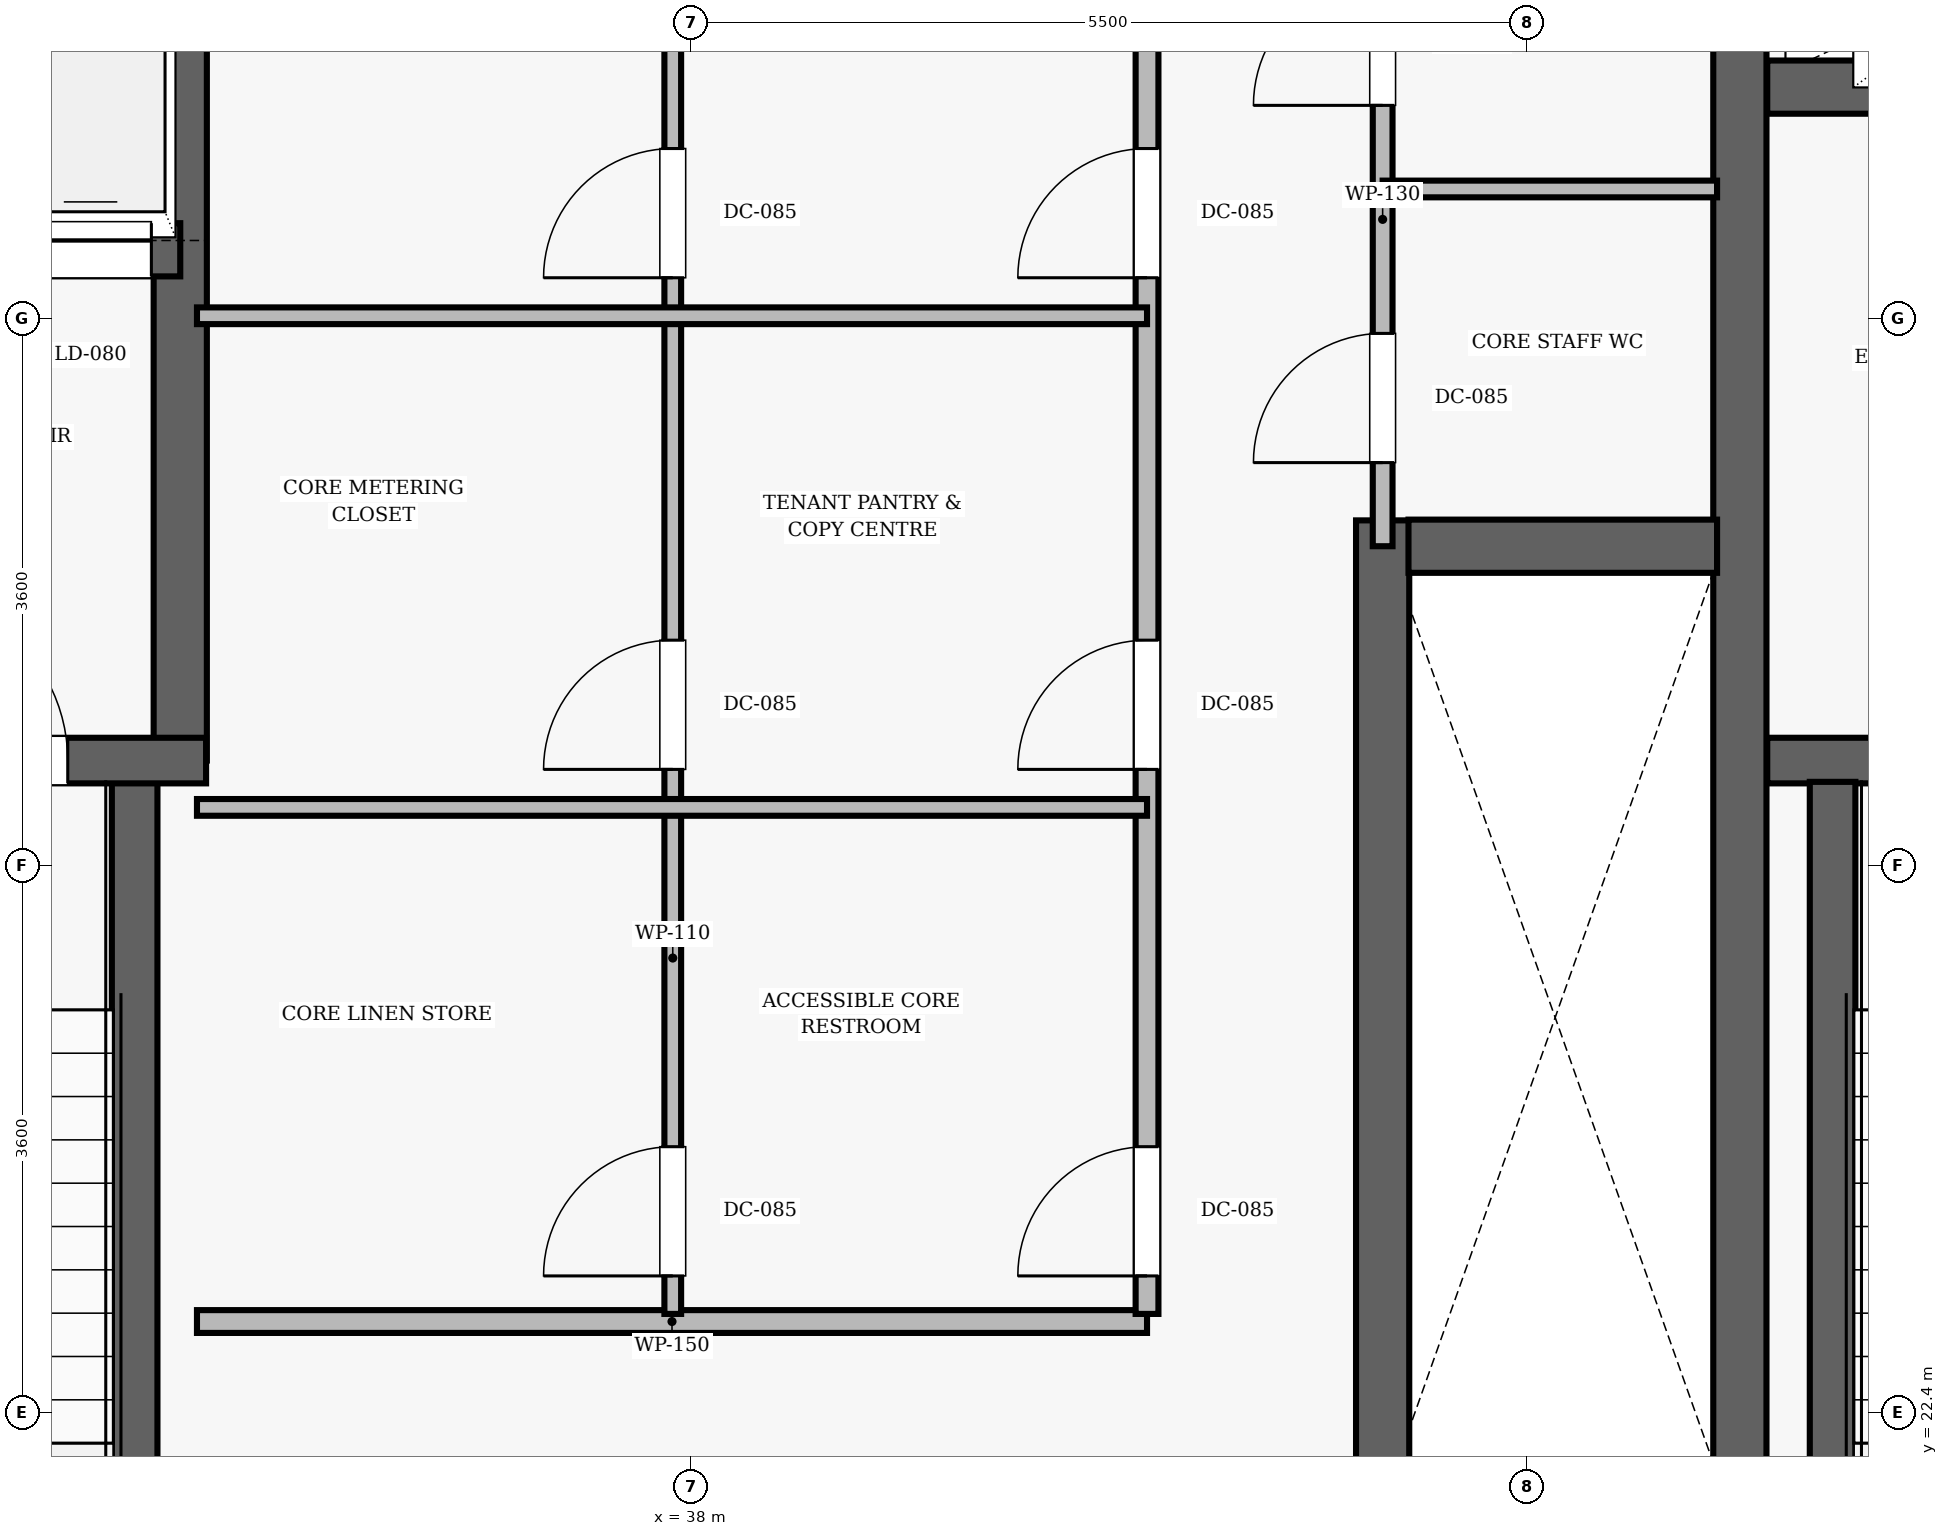
"""IFC4 building model, lengths in metres.
Left out: names, types, materials, properties, quantities, classifications, styles, units other than length and angle.
Written with IfcOpenShell. Run it as: python <this file> out.ifc"""

import sys

from ifc_helpers import new_model, si_unit, direction, frame, frame_2d, origin, place, context, subcontext, project, spatial, rectangle, extrude, element, fill, save


model = new_model("IFC4")
c1 = context("Model", 3, precision=1e-05, world=origin(), true_north=direction((0.0, 1.0)))
c2 = subcontext(c1, "Body", "Model", "MODEL_VIEW")
j1 = project(units=[si_unit("LENGTHUNIT", "METRE"), si_unit("PLANEANGLEUNIT", "RADIAN")], contexts=[c1])
p1 = place(None, origin())
s1 = spatial("IfcSite", under=j1, at=p1, CompositionType="ELEMENT")
p2 = place(p1, origin())
s2 = spatial("IfcBuilding", under=s1, at=p2, CompositionType="ELEMENT")
p3 = place(p2, frame((0.0, 0.0, 178.9)))
s3 = spatial("IfcBuildingStorey", under=s2, at=p3, CompositionType="ELEMENT", Elevation=178.9)
p4 = place(p3, frame((44.9, 19.05, 0.0), z_axis=(0.0, 0.0, 1.0), x_axis=(0.0, 1.0, 0.0)))
e1 = element("IfcWall", 1, at=p4, inside=s3, PredefinedType="SHEAR", context=c2, shape_type="SweptSolid", body=[
    extrude(rectangle(XDim=13.9, YDim=0.35, at=frame_2d((6.95, 0.0))), origin(), (0.0, 0.0, 1.0), 3.85),
])
p5 = place(p3, frame((45.08, 26.69, 0.0), z_axis=(0.0, 0.0, 1.0), x_axis=(1.0, 0.0, 0.0)))
e2 = element("IfcWall", 2, at=p5, inside=s3, PredefinedType="SHEAR", context=c2, shape_type="SweptSolid", body=[
    extrude(rectangle(XDim=3.67, YDim=0.3, at=frame_2d((1.835, 0.0))), origin(), (0.0, 0.0, 1.0), 3.85),
])
p6 = place(p5, frame((1.05, 0.0, 0.0)))
e3 = element("IfcOpeningElement", 3, at=p6, cuts=e2, PredefinedType="OPENING", context=c2, shape_type="SweptSolid", body=[
    extrude(rectangle(XDim=1.1, YDim=2.15, at=frame_2d((0.55, 1.075))), frame((0.0, 0.16, 0.0), z_axis=(0.0, -1.0, 0.0), x_axis=(1.0, 0.0, 0.0)), (0.0, 0.0, 1.0), 0.32),
])
p7 = place(p3, frame((45.51, 19.05, 0.0), z_axis=(0.0, 0.0, 1.0), x_axis=(0.0, 1.0, 0.0)))
e4 = element("IfcWall", 4, at=p7, inside=s3, PredefinedType="SHEAR", context=c2, shape_type="SweptSolid", body=[
    extrude(rectangle(XDim=7.5, YDim=0.3, at=frame_2d((3.75, 0.0))), origin(), (0.0, 0.0, 1.0), 3.85),
])
p8 = place(p3, frame((45.08, 31.12, 0.0), z_axis=(0.0, 0.0, 1.0), x_axis=(1.0, 0.0, 0.0)))
e5 = element("IfcWall", 5, at=p8, inside=s3, PredefinedType="SHEAR", context=c2, shape_type="SweptSolid", body=[
    extrude(rectangle(XDim=3.67, YDim=0.35, at=frame_2d((1.835, 0.0))), origin(), (0.0, 0.0, 1.0), 3.035),
])
p9 = place(p8, frame((1.25, 0.0, 0.0)))
e6 = element("IfcOpeningElement", 6, at=p9, cuts=e5, PredefinedType="OPENING", context=c2, shape_type="SweptSolid", body=[
    extrude(rectangle(XDim=1.1, YDim=2.15, at=frame_2d((0.55, 1.075))), frame((0.0, 0.185, 0.0), z_axis=(0.0, -1.0, 0.0), x_axis=(1.0, 0.0, 0.0)), (0.0, 0.0, 1.0), 0.37),
])
p10 = place(p3, frame((34.34, 19.05, 0.0), z_axis=(0.0, 0.0, 1.0), x_axis=(0.0, 1.0, 0.0)))
e7 = element("IfcWall", 7, at=p10, inside=s3, PredefinedType="SHEAR", context=c2, shape_type="SweptSolid", body=[
    extrude(rectangle(XDim=7.5, YDim=0.3, at=frame_2d((3.75, 0.0))), origin(), (0.0, 0.0, 1.0), 3.85),
])
p11 = place(p3, frame((34.64, 26.69, 0.0), z_axis=(0.0, 0.0, 1.0), x_axis=(0.0, 1.0, 0.0)))
e8 = element("IfcWall", 8, at=p11, inside=s3, PredefinedType="SHEAR", context=c2, shape_type="SweptSolid", body=[
    extrude(rectangle(XDim=6.26, YDim=0.35, at=frame_2d((3.13, 0.0))), origin(), (0.0, 0.0, 1.0), 3.85),
])
p12 = place(p3, frame((31.25, 26.69, 0.0), z_axis=(0.0, 0.0, 1.0), x_axis=(1.0, 0.0, 0.0)))
e9 = element("IfcWall", 9, at=p12, inside=s3, PredefinedType="SHEAR", context=c2, shape_type="SweptSolid", body=[
    extrude(rectangle(XDim=3.56, YDim=0.3, at=frame_2d((1.78, 0.0))), origin(), (0.0, 0.0, 1.0), 3.85),
])
p13 = place(p12, frame((1.55, 0.0, 0.0)))
e10 = element("IfcOpeningElement", 10, at=p13, cuts=e9, PredefinedType="OPENING", context=c2, shape_type="SweptSolid", body=[
    extrude(rectangle(XDim=1.1, YDim=2.15, at=frame_2d((0.55, 1.075))), frame((0.0, 0.16, 0.0), z_axis=(0.0, -1.0, 0.0), x_axis=(1.0, 0.0, 0.0)), (0.0, 0.0, 1.0), 0.32),
])
p14 = place(p3, frame((32.23, 30.05, 0.0), z_axis=(0.0, 0.0, 1.0), x_axis=(1.0, 0.0, 0.0)))
e11 = element("IfcWall", 11, at=p14, inside=s3, PredefinedType="SHEAR", context=c2, shape_type="SweptSolid", body=[
    extrude(rectangle(XDim=2.41, YDim=0.35, at=frame_2d((1.205, 0.0))), origin(), (0.0, 0.0, 1.0), 3.035),
])
p15 = place(p14, frame((0.42, 0.0, 0.0)))
e12 = element("IfcOpeningElement", 12, at=p15, cuts=e11, PredefinedType="OPENING", context=c2, shape_type="SweptSolid", body=[
    extrude(rectangle(XDim=0.8, YDim=2.15, at=frame_2d((0.4, 1.075))), frame((0.0, 0.185, 0.0), z_axis=(0.0, -1.0, 0.0), x_axis=(1.0, 0.0, 0.0)), (0.0, 0.0, 1.0), 0.37),
])
p16 = place(p14, frame((1.42, 0.0, 0.0)))
e13 = element("IfcOpeningElement", 13, at=p16, cuts=e11, PredefinedType="OPENING", context=c2, shape_type="SweptSolid", body=[
    extrude(rectangle(XDim=0.8, YDim=2.15, at=frame_2d((0.4, 1.075))), frame((0.0, 0.185, 0.0), z_axis=(0.0, -1.0, 0.0), x_axis=(1.0, 0.0, 0.0)), (0.0, 0.0, 1.0), 0.37),
])
p17 = place(p3, frame((42.55, 21.73, 0.0), z_axis=(0.0, 0.0, 1.0), x_axis=(0.0, 1.0, 0.0)))
e14 = element("IfcWall", 14, at=p17, inside=s3, PredefinedType="SHEAR", context=c2, shape_type="SweptSolid", body=[
    extrude(rectangle(XDim=6.54, YDim=0.35, at=frame_2d((3.27, 0.0))), origin(), (0.0, 0.0, 1.0), 3.035),
])
p18 = place(p3, frame((42.72, 28.1, 0.0), z_axis=(0.0, 0.0, 1.0), x_axis=(1.0, 0.0, 0.0)))
e15 = element("IfcWall", 15, at=p18, inside=s3, PredefinedType="SHEAR", context=c2, shape_type="SweptSolid", body=[
    extrude(rectangle(XDim=2.03, YDim=0.35, at=frame_2d((1.015, 0.0))), origin(), (0.0, 0.0, 1.0), 3.035),
])
p19 = place(p3, frame((34.75, 23.0, 0.0), z_axis=(0.0, 0.0, 1.0), x_axis=(1.0, 0.0, 0.0)))
e16 = element("IfcWall", 16, at=p19, inside=s3, PredefinedType="PARTITIONING", context=c2, shape_type="SweptSolid", body=[
    extrude(rectangle(XDim=6.25, YDim=0.15, at=frame_2d((3.125, 0.0))), origin(), (0.0, 0.0, 1.0), 3.035),
])
p20 = place(p3, frame((41.0, 23.05, 0.0), z_axis=(0.0, 0.0, 1.0), x_axis=(0.0, 1.0, 0.0)))
e17 = element("IfcWall", 17, at=p20, inside=s3, PredefinedType="PARTITIONING", context=c2, shape_type="SweptSolid", body=[
    extrude(rectangle(XDim=9.8, YDim=0.15, at=frame_2d((4.9, 0.0))), origin(), (0.0, 0.0, 1.0), 3.035),
])
p21 = place(p20, frame((0.25, 0.0, 0.0)))
e18 = element("IfcOpeningElement", 18, at=p21, cuts=e17, PredefinedType="OPENING", context=c2, shape_type="SweptSolid", body=[
    extrude(rectangle(XDim=0.85, YDim=2.1, at=frame_2d((0.425, 1.05))), frame((0.0, 0.085, 0.0), z_axis=(0.0, -1.0, 0.0), x_axis=(1.0, 0.0, 0.0)), (0.0, 0.0, 1.0), 0.17),
])
p22 = place(p20, frame((3.582, 0.0, 0.0)))
e19 = element("IfcOpeningElement", 19, at=p22, cuts=e17, PredefinedType="OPENING", context=c2, shape_type="SweptSolid", body=[
    extrude(rectangle(XDim=0.85, YDim=2.1, at=frame_2d((0.425, 1.05))), frame((0.0, 0.085, 0.0), z_axis=(0.0, -1.0, 0.0), x_axis=(1.0, 0.0, 0.0)), (0.0, 0.0, 1.0), 0.17),
])
p23 = place(p20, frame((6.816, 0.0, 0.0)))
e20 = element("IfcOpeningElement", 20, at=p23, cuts=e17, PredefinedType="OPENING", context=c2, shape_type="SweptSolid", body=[
    extrude(rectangle(XDim=0.85, YDim=2.1, at=frame_2d((0.425, 1.05))), frame((0.0, 0.085, 0.0), z_axis=(0.0, -1.0, 0.0), x_axis=(1.0, 0.0, 0.0)), (0.0, 0.0, 1.0), 0.17),
])
p24 = place(p3, frame((37.88, 23.05, 0.0), z_axis=(0.0, 0.0, 1.0), x_axis=(0.0, 1.0, 0.0)))
e21 = element("IfcWall", 21, at=p24, inside=s3, PredefinedType="PARTITIONING", context=c2, shape_type="SweptSolid", body=[
    extrude(rectangle(XDim=9.8, YDim=0.11, at=frame_2d((4.9, 0.0))), origin(), (0.0, 0.0, 1.0), 3.035),
])
p25 = place(p24, frame((0.25, 0.0, 0.0)))
e22 = element("IfcOpeningElement", 22, at=p25, cuts=e21, PredefinedType="OPENING", context=c2, shape_type="SweptSolid", body=[
    extrude(rectangle(XDim=0.85, YDim=2.1, at=frame_2d((0.425, 1.05))), frame((0.0, 0.065, 0.0), z_axis=(0.0, -1.0, 0.0), x_axis=(1.0, 0.0, 0.0)), (0.0, 0.0, 1.0), 0.13),
])
p26 = place(p24, frame((3.582, 0.0, 0.0)))
e23 = element("IfcOpeningElement", 23, at=p26, cuts=e21, PredefinedType="OPENING", context=c2, shape_type="SweptSolid", body=[
    extrude(rectangle(XDim=0.85, YDim=2.1, at=frame_2d((0.425, 1.05))), frame((0.0, 0.065, 0.0), z_axis=(0.0, -1.0, 0.0), x_axis=(1.0, 0.0, 0.0)), (0.0, 0.0, 1.0), 0.13),
])
p27 = place(p24, frame((6.816, 0.0, 0.0)))
e24 = element("IfcOpeningElement", 24, at=p27, cuts=e21, PredefinedType="OPENING", context=c2, shape_type="SweptSolid", body=[
    extrude(rectangle(XDim=0.85, YDim=2.1, at=frame_2d((0.425, 1.05))), frame((0.0, 0.065, 0.0), z_axis=(0.0, -1.0, 0.0), x_axis=(1.0, 0.0, 0.0)), (0.0, 0.0, 1.0), 0.13),
])
for number, where, z_axis, x_axis in (
    (25, (34.75, 26.382, 0.0), (0.0, 0.0, 1.0), (1.0, 0.0, 0.0)),
    (26, (34.75, 29.616, 0.0), (0.0, 0.0, 1.0), (1.0, 0.0, 0.0)),
):
    element("IfcWall", number, at=place(p3, frame(where, z_axis=z_axis, x_axis=x_axis)), inside=s3, PredefinedType="PARTITIONING", context=c2, shape_type="SweptSolid", body=[
        extrude(rectangle(XDim=6.25, YDim=0.11, at=frame_2d((3.125, 0.0))), origin(), (0.0, 0.0, 1.0), 3.035),
    ])
p28 = place(p3, frame((42.55, 28.1, 0.0), z_axis=(0.0, 0.0, 1.0), x_axis=(0.0, 1.0, 0.0)))
e27 = element("IfcWall", 27, at=p28, inside=s3, PredefinedType="PARTITIONING", context=c2, shape_type="SweptSolid", body=[
    extrude(rectangle(XDim=4.75, YDim=0.13, at=frame_2d((2.375, 0.0))), origin(), (0.0, 0.0, 1.0), 3.035),
])
p29 = place(p28, frame((0.55, 0.0, 0.0)))
e28 = element("IfcOpeningElement", 28, at=p29, cuts=e27, PredefinedType="OPENING", context=c2, shape_type="SweptSolid", body=[
    extrude(rectangle(XDim=0.85, YDim=2.1, at=frame_2d((0.425, 1.05))), frame((0.0, 0.075, 0.0), z_axis=(0.0, -1.0, 0.0), x_axis=(1.0, 0.0, 0.0)), (0.0, 0.0, 1.0), 0.15),
])
p30 = place(p28, frame((2.9, 0.0, 0.0)))
e29 = element("IfcOpeningElement", 29, at=p30, cuts=e27, PredefinedType="OPENING", context=c2, shape_type="SweptSolid", body=[
    extrude(rectangle(XDim=0.85, YDim=2.1, at=frame_2d((0.425, 1.05))), frame((0.0, 0.075, 0.0), z_axis=(0.0, -1.0, 0.0), x_axis=(1.0, 0.0, 0.0)), (0.0, 0.0, 1.0), 0.15),
])
p31 = place(p3, frame((42.55, 30.45, 0.0), z_axis=(0.0, 0.0, 1.0), x_axis=(1.0, 0.0, 0.0)))
e30 = element("IfcWall", 30, at=p31, inside=s3, PredefinedType="PARTITIONING", context=c2, shape_type="SweptSolid", body=[
    extrude(rectangle(XDim=2.2, YDim=0.11, at=frame_2d((1.1, 0.0))), origin(), (0.0, 0.0, 1.0), 3.035),
])
p32 = place(p13, origin())
e31 = element("IfcDoor", 31, at=p32, inside=s3, OperationType="SINGLE_SWING_LEFT", PredefinedType="DOOR", context=c2, shape_type="SweptSolid", body=[
    extrude(rectangle(XDim=1.1, YDim=2.15, at=frame_2d((0.55, 1.075))), frame((0.0, 0.025, 0.0), z_axis=(0.0, -1.0, 0.0), x_axis=(1.0, 0.0, 0.0)), (0.0, 0.0, 1.0), 0.05),
])
fill(e10, e31)
p33 = place(p21, origin())
e32 = element("IfcDoor", 32, at=p33, inside=s3, OperationType="SINGLE_SWING_LEFT", PredefinedType="DOOR", context=c2, shape_type="SweptSolid", body=[
    extrude(rectangle(XDim=0.85, YDim=2.1, at=frame_2d((0.425, 1.05))), frame((0.0, 0.025, 0.0), z_axis=(0.0, -1.0, 0.0), x_axis=(1.0, 0.0, 0.0)), (0.0, 0.0, 1.0), 0.05),
])
fill(e18, e32)
p34 = place(p25, origin())
e33 = element("IfcDoor", 33, at=p34, inside=s3, OperationType="SINGLE_SWING_LEFT", PredefinedType="DOOR", context=c2, shape_type="SweptSolid", body=[
    extrude(rectangle(XDim=0.85, YDim=2.1, at=frame_2d((0.425, 1.05))), frame((0.0, 0.025, 0.0), z_axis=(0.0, -1.0, 0.0), x_axis=(1.0, 0.0, 0.0)), (0.0, 0.0, 1.0), 0.05),
])
fill(e22, e33)
p35 = place(p22, origin())
e34 = element("IfcDoor", 34, at=p35, inside=s3, OperationType="SINGLE_SWING_LEFT", PredefinedType="DOOR", context=c2, shape_type="SweptSolid", body=[
    extrude(rectangle(XDim=0.85, YDim=2.1, at=frame_2d((0.425, 1.05))), frame((0.0, 0.025, 0.0), z_axis=(0.0, -1.0, 0.0), x_axis=(1.0, 0.0, 0.0)), (0.0, 0.0, 1.0), 0.05),
])
fill(e19, e34)
p36 = place(p26, origin())
e35 = element("IfcDoor", 35, at=p36, inside=s3, OperationType="SINGLE_SWING_LEFT", PredefinedType="DOOR", context=c2, shape_type="SweptSolid", body=[
    extrude(rectangle(XDim=0.85, YDim=2.1, at=frame_2d((0.425, 1.05))), frame((0.0, 0.025, 0.0), z_axis=(0.0, -1.0, 0.0), x_axis=(1.0, 0.0, 0.0)), (0.0, 0.0, 1.0), 0.05),
])
fill(e23, e35)
p37 = place(p23, origin())
e36 = element("IfcDoor", 36, at=p37, inside=s3, OperationType="SINGLE_SWING_LEFT", PredefinedType="DOOR", context=c2, shape_type="SweptSolid", body=[
    extrude(rectangle(XDim=0.85, YDim=2.1, at=frame_2d((0.425, 1.05))), frame((0.0, 0.025, 0.0), z_axis=(0.0, -1.0, 0.0), x_axis=(1.0, 0.0, 0.0)), (0.0, 0.0, 1.0), 0.05),
])
fill(e20, e36)
p38 = place(p27, origin())
e37 = element("IfcDoor", 37, at=p38, inside=s3, OperationType="SINGLE_SWING_LEFT", PredefinedType="DOOR", context=c2, shape_type="SweptSolid", body=[
    extrude(rectangle(XDim=0.85, YDim=2.1, at=frame_2d((0.425, 1.05))), frame((0.0, 0.025, 0.0), z_axis=(0.0, -1.0, 0.0), x_axis=(1.0, 0.0, 0.0)), (0.0, 0.0, 1.0), 0.05),
])
fill(e24, e37)
p39 = place(p29, origin())
e38 = element("IfcDoor", 38, at=p39, inside=s3, OperationType="SINGLE_SWING_LEFT", PredefinedType="DOOR", context=c2, shape_type="SweptSolid", body=[
    extrude(rectangle(XDim=0.85, YDim=2.1, at=frame_2d((0.425, 1.05))), frame((0.0, 0.025, 0.0), z_axis=(0.0, -1.0, 0.0), x_axis=(1.0, 0.0, 0.0)), (0.0, 0.0, 1.0), 0.05),
])
fill(e28, e38)
p40 = place(p30, origin())
e39 = element("IfcDoor", 39, at=p40, inside=s3, OperationType="SINGLE_SWING_LEFT", PredefinedType="DOOR", context=c2, shape_type="SweptSolid", body=[
    extrude(rectangle(XDim=0.85, YDim=2.1, at=frame_2d((0.425, 1.05))), frame((0.0, 0.025, 0.0), z_axis=(0.0, -1.0, 0.0), x_axis=(1.0, 0.0, 0.0)), (0.0, 0.0, 1.0), 0.05),
])
fill(e29, e39)
p41 = place(p16, origin())
e40 = element("IfcDoor", 40, at=p41, inside=s3, OperationType="SLIDING_TO_LEFT", PredefinedType="DOOR", context=c2, shape_type="SweptSolid", body=[
    extrude(rectangle(XDim=0.8, YDim=2.15, at=frame_2d((0.4, 1.075))), frame((0.0, 0.025, 0.0), z_axis=(0.0, -1.0, 0.0), x_axis=(1.0, 0.0, 0.0)), (0.0, 0.0, 1.0), 0.05),
])
fill(e13, e40)
save(model, sys.argv[1])
